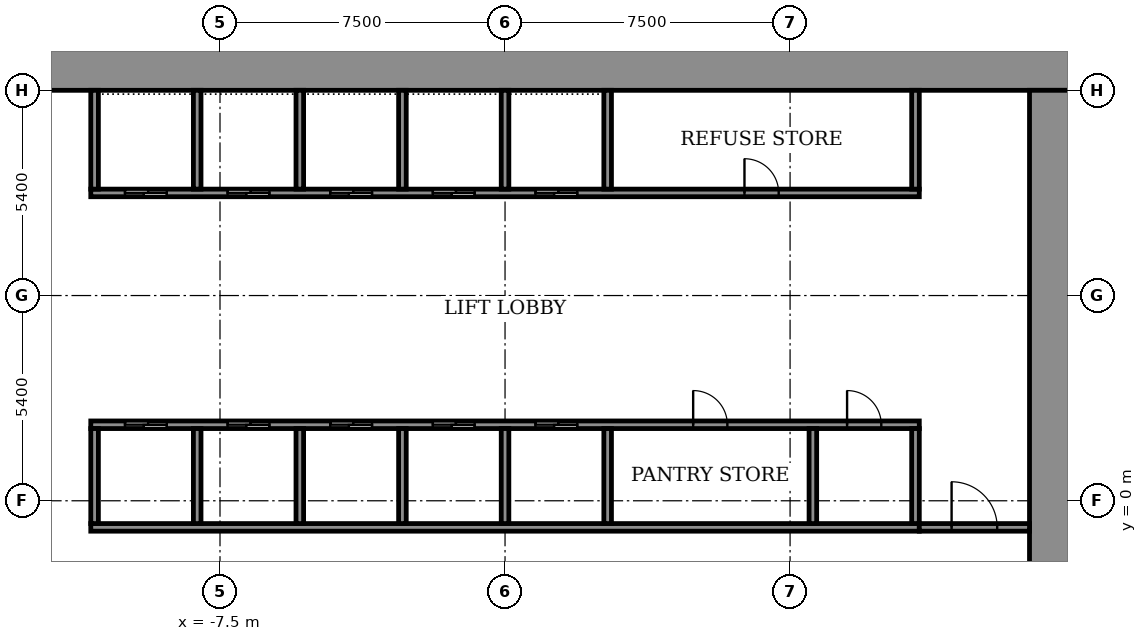
"""IFC4 building model, lengths in metres.
Left out: names, types, materials, properties, quantities, classifications, styles, units other than length and angle.
Written with IfcOpenShell. Run it as: python <this file> out.ifc"""

import sys

from ifc_helpers import new_model, si_unit, direction, frame, frame_2d, origin, place, context, subcontext, project, spatial, rectangle, extrude, element, fill, save


model = new_model("IFC4")
c1 = context("Model", 3, precision=1e-05, world=origin(), true_north=direction((0.0, 1.0)))
c2 = subcontext(c1, "Body", "Model", "MODEL_VIEW")
j1 = project(units=[si_unit("LENGTHUNIT", "METRE"), si_unit("PLANEANGLEUNIT", "RADIAN")], contexts=[c1])
p1 = place(None, origin())
s1 = spatial("IfcSite", under=j1, at=p1, CompositionType="ELEMENT")
p2 = place(p1, origin())
s2 = spatial("IfcBuilding", under=s1, at=p2, CompositionType="ELEMENT")
p3 = place(p2, frame((0.0, 0.0, 41.3)))
s3 = spatial("IfcBuildingStorey", under=s2, at=p3, CompositionType="ELEMENT", Elevation=41.3)
p4 = place(p3, frame((-14.9, 11.35, 0.0), z_axis=(0.0, 0.0, 1.0), x_axis=(1.0, 0.0, 0.0)))
e1 = element("IfcWall", 1, at=p4, inside=s3, PredefinedType="SHEAR", context=c2, shape_type="SweptSolid", body=[
    extrude(rectangle(XDim=29.8, YDim=1.1, at=frame_2d((14.9, 0.0))), origin(), (0.0, 0.0, 1.0), 3.6),
])
p5 = place(p3, frame((14.35, -10.8, 0.0), z_axis=(0.0, 0.0, 1.0), x_axis=(0.0, 1.0, 0.0)))
e2 = element("IfcWall", 2, at=p5, inside=s3, PredefinedType="SHEAR", context=c2, shape_type="SweptSolid", body=[
    extrude(rectangle(XDim=21.6, YDim=1.1, at=frame_2d((10.8, 0.0))), origin(), (0.0, 0.0, 1.0), 3.6),
])
p6 = place(p5, frame((1.2, 0.0, 0.0)))
e3 = element("IfcOpeningElement", 3, at=p6, cuts=e2, PredefinedType="OPENING", context=c2, shape_type="SweptSolid", body=[
    extrude(rectangle(XDim=1.2, YDim=2.1, at=frame_2d((0.6, 1.05))), frame((0.0, 0.56, 0.0), z_axis=(0.0, -1.0, 0.0), x_axis=(1.0, 0.0, 0.0)), (0.0, 0.0, 1.0), 1.12),
])
p7 = place(p3, frame((-10.9, -0.7, 0.0), z_axis=(0.0, 0.0, 1.0), x_axis=(1.0, 0.0, 0.0)))
e4 = element("IfcWall", 4, at=p7, inside=s3, PredefinedType="SHEAR", context=c2, shape_type="SweptSolid", body=[
    extrude(rectangle(XDim=21.8, YDim=0.2, at=frame_2d((10.9, 0.0))), origin(), (0.0, 0.0, 1.0), 3.05),
])
p8 = place(p3, frame((-10.9, 2.0, 0.0), z_axis=(0.0, 0.0, 1.0), x_axis=(1.0, 0.0, 0.0)))
e5 = element("IfcWall", 5, at=p8, inside=s3, PredefinedType="SHEAR", context=c2, shape_type="SweptSolid", body=[
    extrude(rectangle(XDim=21.8, YDim=0.2, at=frame_2d((10.9, 0.0))), origin(), (0.0, 0.0, 1.0), 3.05),
])
p9 = place(p8, frame((0.9, 0.0, 0.0)))
e6 = element("IfcOpeningElement", 6, at=p9, cuts=e5, PredefinedType="OPENING", context=c2, shape_type="SweptSolid", body=[
    extrude(rectangle(XDim=1.1, YDim=2.1, at=frame_2d((0.55, 1.05))), frame((0.0, 0.11, 0.0), z_axis=(0.0, -1.0, 0.0), x_axis=(1.0, 0.0, 0.0)), (0.0, 0.0, 1.0), 0.22),
])
p10 = place(p8, frame((3.6, 0.0, 0.0)))
e7 = element("IfcOpeningElement", 7, at=p10, cuts=e5, PredefinedType="OPENING", context=c2, shape_type="SweptSolid", body=[
    extrude(rectangle(XDim=1.1, YDim=2.1, at=frame_2d((0.55, 1.05))), frame((0.0, 0.11, 0.0), z_axis=(0.0, -1.0, 0.0), x_axis=(1.0, 0.0, 0.0)), (0.0, 0.0, 1.0), 0.22),
])
p11 = place(p8, frame((6.3, 0.0, 0.0)))
e8 = element("IfcOpeningElement", 8, at=p11, cuts=e5, PredefinedType="OPENING", context=c2, shape_type="SweptSolid", body=[
    extrude(rectangle(XDim=1.1, YDim=2.1, at=frame_2d((0.55, 1.05))), frame((0.0, 0.11, 0.0), z_axis=(0.0, -1.0, 0.0), x_axis=(1.0, 0.0, 0.0)), (0.0, 0.0, 1.0), 0.22),
])
p12 = place(p8, frame((9.0, 0.0, 0.0)))
e9 = element("IfcOpeningElement", 9, at=p12, cuts=e5, PredefinedType="OPENING", context=c2, shape_type="SweptSolid", body=[
    extrude(rectangle(XDim=1.1, YDim=2.1, at=frame_2d((0.55, 1.05))), frame((0.0, 0.11, 0.0), z_axis=(0.0, -1.0, 0.0), x_axis=(1.0, 0.0, 0.0)), (0.0, 0.0, 1.0), 0.22),
])
p13 = place(p8, frame((11.7, 0.0, 0.0)))
e10 = element("IfcOpeningElement", 10, at=p13, cuts=e5, PredefinedType="OPENING", context=c2, shape_type="SweptSolid", body=[
    extrude(rectangle(XDim=1.1, YDim=2.1, at=frame_2d((0.55, 1.05))), frame((0.0, 0.11, 0.0), z_axis=(0.0, -1.0, 0.0), x_axis=(1.0, 0.0, 0.0)), (0.0, 0.0, 1.0), 0.22),
])
p14 = place(p8, frame((15.85, 0.0, 0.0)))
e11 = element("IfcOpeningElement", 11, at=p14, cuts=e5, PredefinedType="OPENING", context=c2, shape_type="SweptSolid", body=[
    extrude(rectangle(XDim=0.9, YDim=2.1, at=frame_2d((0.45, 1.05))), frame((0.0, 0.11, 0.0), z_axis=(0.0, -1.0, 0.0), x_axis=(1.0, 0.0, 0.0)), (0.0, 0.0, 1.0), 0.22),
])
p15 = place(p8, frame((19.9, 0.0, 0.0)))
e12 = element("IfcOpeningElement", 12, at=p15, cuts=e5, PredefinedType="OPENING", context=c2, shape_type="SweptSolid", body=[
    extrude(rectangle(XDim=0.9, YDim=2.1, at=frame_2d((0.45, 1.05))), frame((0.0, 0.11, 0.0), z_axis=(0.0, -1.0, 0.0), x_axis=(1.0, 0.0, 0.0)), (0.0, 0.0, 1.0), 0.22),
])
p16 = place(p3, frame((-10.9, 8.1, 0.0), z_axis=(0.0, 0.0, 1.0), x_axis=(1.0, 0.0, 0.0)))
e13 = element("IfcWall", 13, at=p16, inside=s3, PredefinedType="SHEAR", context=c2, shape_type="SweptSolid", body=[
    extrude(rectangle(XDim=21.8, YDim=0.2, at=frame_2d((10.9, 0.0))), origin(), (0.0, 0.0, 1.0), 3.05),
])
p17 = place(p16, frame((0.9, 0.0, 0.0)))
e14 = element("IfcOpeningElement", 14, at=p17, cuts=e13, PredefinedType="OPENING", context=c2, shape_type="SweptSolid", body=[
    extrude(rectangle(XDim=1.1, YDim=2.1, at=frame_2d((0.55, 1.05))), frame((0.0, 0.11, 0.0), z_axis=(0.0, -1.0, 0.0), x_axis=(1.0, 0.0, 0.0)), (0.0, 0.0, 1.0), 0.22),
])
p18 = place(p16, frame((3.6, 0.0, 0.0)))
e15 = element("IfcOpeningElement", 15, at=p18, cuts=e13, PredefinedType="OPENING", context=c2, shape_type="SweptSolid", body=[
    extrude(rectangle(XDim=1.1, YDim=2.1, at=frame_2d((0.55, 1.05))), frame((0.0, 0.11, 0.0), z_axis=(0.0, -1.0, 0.0), x_axis=(1.0, 0.0, 0.0)), (0.0, 0.0, 1.0), 0.22),
])
p19 = place(p16, frame((6.3, 0.0, 0.0)))
e16 = element("IfcOpeningElement", 16, at=p19, cuts=e13, PredefinedType="OPENING", context=c2, shape_type="SweptSolid", body=[
    extrude(rectangle(XDim=1.1, YDim=2.1, at=frame_2d((0.55, 1.05))), frame((0.0, 0.11, 0.0), z_axis=(0.0, -1.0, 0.0), x_axis=(1.0, 0.0, 0.0)), (0.0, 0.0, 1.0), 0.22),
])
p20 = place(p16, frame((9.0, 0.0, 0.0)))
e17 = element("IfcOpeningElement", 17, at=p20, cuts=e13, PredefinedType="OPENING", context=c2, shape_type="SweptSolid", body=[
    extrude(rectangle(XDim=1.1, YDim=2.1, at=frame_2d((0.55, 1.05))), frame((0.0, 0.11, 0.0), z_axis=(0.0, -1.0, 0.0), x_axis=(1.0, 0.0, 0.0)), (0.0, 0.0, 1.0), 0.22),
])
p21 = place(p16, frame((11.7, 0.0, 0.0)))
e18 = element("IfcOpeningElement", 18, at=p21, cuts=e13, PredefinedType="OPENING", context=c2, shape_type="SweptSolid", body=[
    extrude(rectangle(XDim=1.1, YDim=2.1, at=frame_2d((0.55, 1.05))), frame((0.0, 0.11, 0.0), z_axis=(0.0, -1.0, 0.0), x_axis=(1.0, 0.0, 0.0)), (0.0, 0.0, 1.0), 0.22),
])
p22 = place(p16, frame((17.2, 0.0, 0.0)))
e19 = element("IfcOpeningElement", 19, at=p22, cuts=e13, PredefinedType="OPENING", context=c2, shape_type="SweptSolid", body=[
    extrude(rectangle(XDim=0.9, YDim=2.1, at=frame_2d((0.45, 1.05))), frame((0.0, 0.11, 0.0), z_axis=(0.0, -1.0, 0.0), x_axis=(1.0, 0.0, 0.0)), (0.0, 0.0, 1.0), 0.22),
])
for number, where, z_axis, x_axis in (
    (20, (-10.8, -0.6, 0.0), (0.0, 0.0, 1.0), (0.0, 1.0, 0.0)),
    (21, (-8.1, -0.6, 0.0), (0.0, 0.0, 1.0), (0.0, 1.0, 0.0)),
    (22, (-5.4, -0.6, 0.0), (0.0, 0.0, 1.0), (0.0, 1.0, 0.0)),
    (23, (-2.7, -0.6, 0.0), (0.0, 0.0, 1.0), (0.0, 1.0, 0.0)),
    (24, (0.0, -0.6, 0.0), (0.0, 0.0, 1.0), (0.0, 1.0, 0.0)),
    (25, (2.7, -0.6, 0.0), (0.0, 0.0, 1.0), (0.0, 1.0, 0.0)),
):
    element("IfcWall", number, at=place(p3, frame(where, z_axis=z_axis, x_axis=x_axis)), inside=s3, PredefinedType="SHEAR", context=c2, shape_type="SweptSolid", body=[
        extrude(rectangle(XDim=2.5, YDim=0.2, at=frame_2d((1.25, 0.0))), origin(), (0.0, 0.0, 1.0), 3.05),
    ])
for number, where, z_axis, x_axis in (
    (26, (8.1, -0.6, 0.0), (0.0, 0.0, 1.0), (0.0, 1.0, 0.0)),
    (27, (10.8, -0.6, 0.0), (0.0, 0.0, 1.0), (0.0, 1.0, 0.0)),
):
    element("IfcWall", number, at=place(p3, frame(where, z_axis=z_axis, x_axis=x_axis)), inside=s3, PredefinedType="STANDARD", context=c2, shape_type="SweptSolid", body=[
        extrude(rectangle(XDim=2.5, YDim=0.2, at=frame_2d((1.25, 0.0))), origin(), (0.0, 0.0, 1.0), 3.05),
    ])
for number, where, z_axis, x_axis in (
    (28, (-10.8, 8.2, 0.0), (0.0, 0.0, 1.0), (0.0, 1.0, 0.0)),
    (29, (-8.1, 8.2, 0.0), (0.0, 0.0, 1.0), (0.0, 1.0, 0.0)),
    (30, (-5.4, 8.2, 0.0), (0.0, 0.0, 1.0), (0.0, 1.0, 0.0)),
    (31, (-2.7, 8.2, 0.0), (0.0, 0.0, 1.0), (0.0, 1.0, 0.0)),
    (32, (0.0, 8.2, 0.0), (0.0, 0.0, 1.0), (0.0, 1.0, 0.0)),
    (33, (2.7, 8.2, 0.0), (0.0, 0.0, 1.0), (0.0, 1.0, 0.0)),
):
    element("IfcWall", number, at=place(p3, frame(where, z_axis=z_axis, x_axis=x_axis)), inside=s3, PredefinedType="SHEAR", context=c2, shape_type="SweptSolid", body=[
        extrude(rectangle(XDim=2.6, YDim=0.2, at=frame_2d((1.3, 0.0))), origin(), (0.0, 0.0, 1.0), 3.05),
    ])
p23 = place(p3, frame((10.8, 8.2, 0.0), z_axis=(0.0, 0.0, 1.0), x_axis=(0.0, 1.0, 0.0)))
e34 = element("IfcWall", 34, at=p23, inside=s3, PredefinedType="STANDARD", context=c2, shape_type="SweptSolid", body=[
    extrude(rectangle(XDim=2.6, YDim=0.2, at=frame_2d((1.3, 0.0))), origin(), (0.0, 0.0, 1.0), 3.05),
])
p24 = place(p3, frame((10.9, -0.7, 0.0), z_axis=(0.0, 0.0, 1.0), x_axis=(1.0, 0.0, 0.0)))
e35 = element("IfcWall", 35, at=p24, inside=s3, PredefinedType="STANDARD", context=c2, shape_type="SweptSolid", body=[
    extrude(rectangle(XDim=2.9, YDim=0.2, at=frame_2d((1.45, 0.0))), origin(), (0.0, 0.0, 1.0), 3.05),
])
p25 = place(p24, frame((0.85, 0.0, 0.0)))
e36 = element("IfcOpeningElement", 36, at=p25, cuts=e35, PredefinedType="OPENING", context=c2, shape_type="SweptSolid", body=[
    extrude(rectangle(XDim=1.2, YDim=2.1, at=frame_2d((0.6, 1.05))), frame((0.0, 0.11, 0.0), z_axis=(0.0, -1.0, 0.0), x_axis=(1.0, 0.0, 0.0)), (0.0, 0.0, 1.0), 0.22),
])
p26 = place(p9, origin())
e37 = element("IfcDoor", 37, at=p26, inside=s3, OperationType="SLIDING_TO_LEFT", PredefinedType="DOOR", context=c2, shape_type="SweptSolid", body=[
    extrude(rectangle(XDim=1.1, YDim=2.1, at=frame_2d((0.55, 1.05))), frame((0.0, 0.025, 0.0), z_axis=(0.0, -1.0, 0.0), x_axis=(1.0, 0.0, 0.0)), (0.0, 0.0, 1.0), 0.05),
])
fill(e6, e37)
p27 = place(p10, origin())
e38 = element("IfcDoor", 38, at=p27, inside=s3, OperationType="SLIDING_TO_LEFT", PredefinedType="DOOR", context=c2, shape_type="SweptSolid", body=[
    extrude(rectangle(XDim=1.1, YDim=2.1, at=frame_2d((0.55, 1.05))), frame((0.0, 0.025, 0.0), z_axis=(0.0, -1.0, 0.0), x_axis=(1.0, 0.0, 0.0)), (0.0, 0.0, 1.0), 0.05),
])
fill(e7, e38)
p28 = place(p11, origin())
e39 = element("IfcDoor", 39, at=p28, inside=s3, OperationType="SLIDING_TO_LEFT", PredefinedType="DOOR", context=c2, shape_type="SweptSolid", body=[
    extrude(rectangle(XDim=1.1, YDim=2.1, at=frame_2d((0.55, 1.05))), frame((0.0, 0.025, 0.0), z_axis=(0.0, -1.0, 0.0), x_axis=(1.0, 0.0, 0.0)), (0.0, 0.0, 1.0), 0.05),
])
fill(e8, e39)
p29 = place(p12, origin())
e40 = element("IfcDoor", 40, at=p29, inside=s3, OperationType="SLIDING_TO_LEFT", PredefinedType="DOOR", context=c2, shape_type="SweptSolid", body=[
    extrude(rectangle(XDim=1.1, YDim=2.1, at=frame_2d((0.55, 1.05))), frame((0.0, 0.025, 0.0), z_axis=(0.0, -1.0, 0.0), x_axis=(1.0, 0.0, 0.0)), (0.0, 0.0, 1.0), 0.05),
])
fill(e9, e40)
p30 = place(p13, origin())
e41 = element("IfcDoor", 41, at=p30, inside=s3, OperationType="SLIDING_TO_LEFT", PredefinedType="DOOR", context=c2, shape_type="SweptSolid", body=[
    extrude(rectangle(XDim=1.1, YDim=2.1, at=frame_2d((0.55, 1.05))), frame((0.0, 0.025, 0.0), z_axis=(0.0, -1.0, 0.0), x_axis=(1.0, 0.0, 0.0)), (0.0, 0.0, 1.0), 0.05),
])
fill(e10, e41)
p31 = place(p17, origin())
e42 = element("IfcDoor", 42, at=p31, inside=s3, OperationType="SLIDING_TO_LEFT", PredefinedType="DOOR", context=c2, shape_type="SweptSolid", body=[
    extrude(rectangle(XDim=1.1, YDim=2.1, at=frame_2d((0.55, 1.05))), frame((0.0, 0.025, 0.0), z_axis=(0.0, -1.0, 0.0), x_axis=(1.0, 0.0, 0.0)), (0.0, 0.0, 1.0), 0.05),
])
fill(e14, e42)
p32 = place(p18, origin())
e43 = element("IfcDoor", 43, at=p32, inside=s3, OperationType="SLIDING_TO_LEFT", PredefinedType="DOOR", context=c2, shape_type="SweptSolid", body=[
    extrude(rectangle(XDim=1.1, YDim=2.1, at=frame_2d((0.55, 1.05))), frame((0.0, 0.025, 0.0), z_axis=(0.0, -1.0, 0.0), x_axis=(1.0, 0.0, 0.0)), (0.0, 0.0, 1.0), 0.05),
])
fill(e15, e43)
p33 = place(p19, origin())
e44 = element("IfcDoor", 44, at=p33, inside=s3, OperationType="SLIDING_TO_LEFT", PredefinedType="DOOR", context=c2, shape_type="SweptSolid", body=[
    extrude(rectangle(XDim=1.1, YDim=2.1, at=frame_2d((0.55, 1.05))), frame((0.0, 0.025, 0.0), z_axis=(0.0, -1.0, 0.0), x_axis=(1.0, 0.0, 0.0)), (0.0, 0.0, 1.0), 0.05),
])
fill(e16, e44)
p34 = place(p20, origin())
e45 = element("IfcDoor", 45, at=p34, inside=s3, OperationType="SLIDING_TO_LEFT", PredefinedType="DOOR", context=c2, shape_type="SweptSolid", body=[
    extrude(rectangle(XDim=1.1, YDim=2.1, at=frame_2d((0.55, 1.05))), frame((0.0, 0.025, 0.0), z_axis=(0.0, -1.0, 0.0), x_axis=(1.0, 0.0, 0.0)), (0.0, 0.0, 1.0), 0.05),
])
fill(e17, e45)
p35 = place(p21, origin())
e46 = element("IfcDoor", 46, at=p35, inside=s3, OperationType="SLIDING_TO_LEFT", PredefinedType="DOOR", context=c2, shape_type="SweptSolid", body=[
    extrude(rectangle(XDim=1.1, YDim=2.1, at=frame_2d((0.55, 1.05))), frame((0.0, 0.025, 0.0), z_axis=(0.0, -1.0, 0.0), x_axis=(1.0, 0.0, 0.0)), (0.0, 0.0, 1.0), 0.05),
])
fill(e18, e46)
p36 = place(p14, origin())
e47 = element("IfcDoor", 47, at=p36, inside=s3, OperationType="SINGLE_SWING_RIGHT", PredefinedType="DOOR", context=c2, shape_type="SweptSolid", body=[
    extrude(rectangle(XDim=0.9, YDim=2.1, at=frame_2d((0.45, 1.05))), frame((0.0, 0.025, 0.0), z_axis=(0.0, -1.0, 0.0), x_axis=(1.0, 0.0, 0.0)), (0.0, 0.0, 1.0), 0.05),
])
fill(e11, e47)
p37 = place(p15, origin())
e48 = element("IfcDoor", 48, at=p37, inside=s3, OperationType="SINGLE_SWING_RIGHT", PredefinedType="DOOR", context=c2, shape_type="SweptSolid", body=[
    extrude(rectangle(XDim=0.9, YDim=2.1, at=frame_2d((0.45, 1.05))), frame((0.0, 0.025, 0.0), z_axis=(0.0, -1.0, 0.0), x_axis=(1.0, 0.0, 0.0)), (0.0, 0.0, 1.0), 0.05),
])
fill(e12, e48)
p38 = place(p22, origin())
e49 = element("IfcDoor", 49, at=p38, inside=s3, OperationType="SINGLE_SWING_RIGHT", PredefinedType="DOOR", context=c2, shape_type="SweptSolid", body=[
    extrude(rectangle(XDim=0.9, YDim=2.1, at=frame_2d((0.45, 1.05))), frame((0.0, 0.025, 0.0), z_axis=(0.0, -1.0, 0.0), x_axis=(1.0, 0.0, 0.0)), (0.0, 0.0, 1.0), 0.05),
])
fill(e19, e49)
p39 = place(p25, origin())
e50 = element("IfcDoor", 50, at=p39, inside=s3, OperationType="SINGLE_SWING_LEFT", PredefinedType="DOOR", context=c2, shape_type="SweptSolid", body=[
    extrude(rectangle(XDim=1.2, YDim=2.1, at=frame_2d((0.6, 1.05))), frame((0.0, 0.025, 0.0), z_axis=(0.0, -1.0, 0.0), x_axis=(1.0, 0.0, 0.0)), (0.0, 0.0, 1.0), 0.05),
])
fill(e36, e50)
save(model, sys.argv[1])
